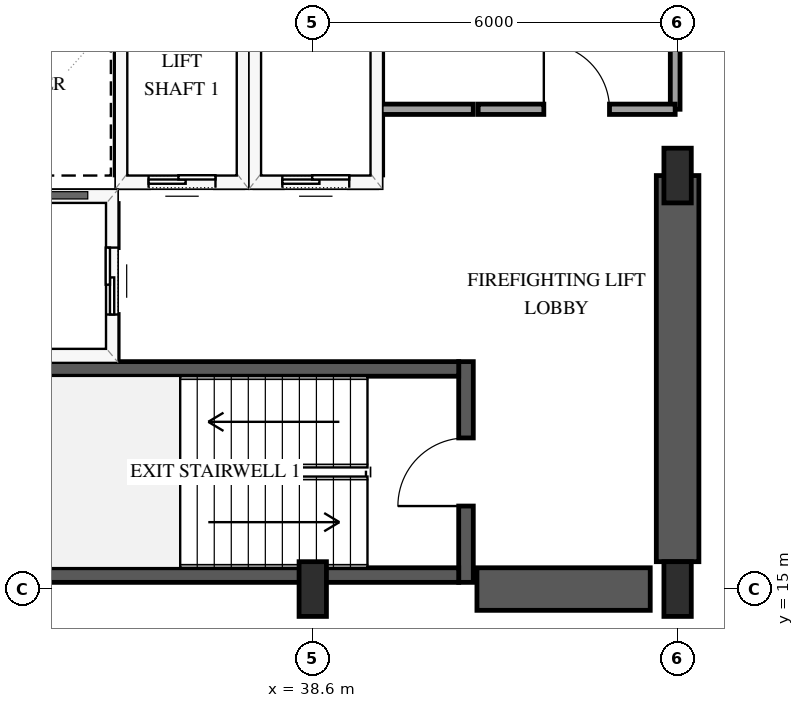
"""IFC4 building model, lengths in metres.
Left out: names, types, materials, properties, quantities, classifications, styles, units other than length and angle.
Written with IfcOpenShell. Run it as: python <this file> out.ifc"""

import sys

from ifc_helpers import new_model, si_unit, direction, frame, frame_2d, origin, origin_2d, place, context, subcontext, project, spatial, rectangle, extrude, element, fill, save


model = new_model("IFC4")
c1 = context("Model", 3, precision=1e-05, world=origin(), true_north=direction((0.0, 1.0)))
c2 = subcontext(c1, "Body", "Model", "MODEL_VIEW")
j1 = project(units=[si_unit("LENGTHUNIT", "METRE"), si_unit("PLANEANGLEUNIT", "RADIAN")], contexts=[c1])
p1 = place(None, origin())
s1 = spatial("IfcSite", under=j1, at=p1, CompositionType="ELEMENT")
p2 = place(p1, origin())
s2 = spatial("IfcBuilding", under=s1, at=p2, CompositionType="ELEMENT")
p3 = place(p2, frame((0.0, 0.0, 42.6)))
s3 = spatial("IfcBuildingStorey", under=s2, at=p3, CompositionType="ELEMENT", Elevation=42.6)
p4 = place(p3, frame((41.12, 15.11, 0.0), z_axis=(0.0, 0.0, 1.0), x_axis=(0.0, 1.0, 0.0)))
e1 = element("IfcWall", 1, at=p4, inside=s3, PredefinedType="SHEAR", context=c2, shape_type="SweptSolid", body=[
    extrude(rectangle(XDim=3.63, YDim=0.24, at=frame_2d((1.815, 0.0))), origin(), (0.0, 0.0, 1.0), 4.0),
])
p5 = place(p4, frame((1.255, 0.0, 0.0)))
e2 = element("IfcOpeningElement", 2, at=p5, cuts=e1, PredefinedType="OPENING", context=c2, shape_type="SweptSolid", body=[
    extrude(rectangle(XDim=1.12, YDim=2.15, at=frame_2d((0.56, 1.075))), frame((0.0, 0.13, 0.0), z_axis=(0.0, -1.0, 0.0), x_axis=(1.0, 0.0, 0.0)), (0.0, 0.0, 1.0), 0.26),
])
for number, where, z_axis, x_axis in (
    (3, (33.0, 15.23, 0.0), (0.0, 0.0, 1.0), (1.0, 0.0, 0.0)),
    (4, (33.0, 18.62, 0.0), (0.0, 0.0, 1.0), (1.0, 0.0, 0.0)),
):
    element("IfcWall", number, at=place(p3, frame(where, z_axis=z_axis, x_axis=x_axis)), inside=s3, PredefinedType="SHEAR", context=c2, shape_type="SweptSolid", body=[
        extrude(rectangle(XDim=8.0, YDim=0.24, at=frame_2d((4.0, 0.0))), origin(), (0.0, 0.0, 1.0), 4.0),
    ])
p6 = place(p3, frame((41.3, 15.0, 0.0), z_axis=(0.0, 0.0, 1.0), x_axis=(1.0, 0.0, 0.0)))
e5 = element("IfcWall", 5, at=p6, inside=s3, PredefinedType="SHEAR", context=c2, shape_type="SweptSolid", body=[
    extrude(rectangle(XDim=2.85, YDim=0.7, at=frame_2d((1.425, 0.0))), origin(), (0.0, 0.0, 1.0), 4.0),
])
p7 = place(p3, frame((44.6, 15.45, 0.0), z_axis=(0.0, 0.0, 1.0), x_axis=(0.0, 1.0, 0.0)))
e6 = element("IfcWall", 6, at=p7, inside=s3, PredefinedType="SHEAR", context=c2, shape_type="SweptSolid", body=[
    extrude(rectangle(XDim=6.35, YDim=0.7, at=frame_2d((3.175, 0.0))), origin(), (0.0, 0.0, 1.0), 4.0),
])
for number, where, z_axis, x_axis in (
    (7, (38.6, 15.0, 0.0), (0.0, 0.0, 1.0), (1.0, 0.0, 0.0)),
    (8, (44.6, 15.0, 0.0), (0.0, 0.0, 1.0), (1.0, 0.0, 0.0)),
    (9, (44.6, 21.8, 0.0), (0.0, 0.0, 1.0), (1.0, 0.0, 0.0)),
):
    element("IfcColumn", number, at=place(p3, frame(where, z_axis=z_axis, x_axis=x_axis)), inside=s3, PredefinedType="PILASTER", context=c2, shape_type="SweptSolid", body=[
        extrude(rectangle(XDim=0.45, YDim=0.9, at=origin_2d()), origin(), (0.0, 0.0, 1.0), 4.0),
    ])
p8 = place(p3, frame((35.45, 21.7, 0.0), z_axis=(0.0, 0.0, 1.0), x_axis=(1.0, 0.0, 0.0)))
e10 = element("IfcWall", 10, at=p8, inside=s3, PredefinedType="SOLIDWALL", context=c2, shape_type="SweptSolid", body=[
    extrude(rectangle(XDim=2.0, YDim=0.2, at=frame_2d((1.0, 0.0))), origin(), (0.0, 0.0, 1.0), 3.7),
])
p9 = place(p8, frame((0.45, 0.0, 0.0)))
e11 = element("IfcOpeningElement", 11, at=p9, cuts=e10, PredefinedType="OPENING", context=c2, shape_type="SweptSolid", body=[
    extrude(rectangle(XDim=1.1, YDim=2.15, at=frame_2d((0.55, 1.075))), frame((0.0, 0.11, 0.0), z_axis=(0.0, -1.0, 0.0), x_axis=(1.0, 0.0, 0.0)), (0.0, 0.0, 1.0), 0.22),
])
for number, where, z_axis, x_axis in (
    (12, (35.45, 21.81, 0.0), (0.0, 0.0, 1.0), (0.0, 1.0, 0.0)),
    (13, (37.45, 21.81, 0.0), (0.0, 0.0, 1.0), (0.0, 1.0, 0.0)),
):
    element("IfcWall", number, at=place(p3, frame(where, z_axis=z_axis, x_axis=x_axis)), inside=s3, PredefinedType="SOLIDWALL", context=c2, shape_type="SweptSolid", body=[
        extrude(rectangle(XDim=2.38, YDim=0.2, at=frame_2d((1.19, 0.0))), origin(), (0.0, 0.0, 1.0), 3.7),
    ])
p10 = place(p3, frame((37.65, 21.7, 0.0), z_axis=(0.0, 0.0, 1.0), x_axis=(1.0, 0.0, 0.0)))
e14 = element("IfcWall", 14, at=p10, inside=s3, PredefinedType="SOLIDWALL", context=c2, shape_type="SweptSolid", body=[
    extrude(rectangle(XDim=2.0, YDim=0.2, at=frame_2d((1.0, 0.0))), origin(), (0.0, 0.0, 1.0), 3.7),
])
p11 = place(p10, frame((0.45, 0.0, 0.0)))
e15 = element("IfcOpeningElement", 15, at=p11, cuts=e14, PredefinedType="OPENING", context=c2, shape_type="SweptSolid", body=[
    extrude(rectangle(XDim=1.1, YDim=2.15, at=frame_2d((0.55, 1.075))), frame((0.0, 0.11, 0.0), z_axis=(0.0, -1.0, 0.0), x_axis=(1.0, 0.0, 0.0)), (0.0, 0.0, 1.0), 0.22),
])
p12 = place(p3, frame((39.65, 21.81, 0.0), z_axis=(0.0, 0.0, 1.0), x_axis=(0.0, 1.0, 0.0)))
e16 = element("IfcWall", 16, at=p12, inside=s3, PredefinedType="SOLIDWALL", context=c2, shape_type="SweptSolid", body=[
    extrude(rectangle(XDim=2.38, YDim=0.2, at=frame_2d((1.19, 0.0))), origin(), (0.0, 0.0, 1.0), 3.7),
])
p13 = place(p3, frame((32.72, 21.45, 0.0), z_axis=(0.0, 0.0, 1.0), x_axis=(1.0, 0.0, 0.0)))
e17 = element("IfcWall", 17, at=p13, inside=s3, PredefinedType="SOLIDWALL", context=c2, shape_type="SweptSolid", body=[
    extrude(rectangle(XDim=2.58, YDim=0.2, at=frame_2d((1.29, 0.0))), origin(), (0.0, 0.0, 1.0), 3.7),
])
p14 = place(p3, frame((35.3, 18.79, 0.0), z_axis=(0.0, 0.0, 1.0), x_axis=(0.0, 1.0, 0.0)))
e18 = element("IfcWall", 18, at=p14, inside=s3, PredefinedType="SOLIDWALL", context=c2, shape_type="SweptSolid", body=[
    extrude(rectangle(XDim=2.55, YDim=0.2, at=frame_2d((1.275, 0.0))), origin(), (0.0, 0.0, 1.0), 3.7),
])
p15 = place(p14, frame((0.725, 0.0, 0.0)))
e19 = element("IfcOpeningElement", 19, at=p15, cuts=e18, PredefinedType="OPENING", context=c2, shape_type="SweptSolid", body=[
    extrude(rectangle(XDim=1.1, YDim=2.15, at=frame_2d((0.55, 1.075))), frame((0.0, 0.11, 0.0), z_axis=(0.0, -1.0, 0.0), x_axis=(1.0, 0.0, 0.0)), (0.0, 0.0, 1.0), 0.22),
])
p16 = place(p3, frame((44.56, 29.8, 0.0), z_axis=(0.0, 0.0, 1.0), x_axis=(0.0, -1.0, 0.0)))
e20 = element("IfcWall", 20, at=p16, inside=s3, PredefinedType="PARTITIONING", context=c2, shape_type="SweptSolid", body=[
    extrude(rectangle(XDim=6.91, YDim=0.16, at=frame_2d((3.455, 0.0))), origin(), (0.0, 0.0, 1.0), 2.74),
])
p17 = place(p16, frame((2.915, 0.0, 0.0)))
e21 = element("IfcOpeningElement", 21, at=p17, cuts=e20, PredefinedType="OPENING", context=c2, shape_type="SweptSolid", body=[
    extrude(rectangle(XDim=1.08, YDim=2.15, at=frame_2d((0.54, 1.075))), frame((0.0, 0.09, 0.0), z_axis=(0.0, -1.0, 0.0), x_axis=(1.0, 0.0, 0.0)), (0.0, 0.0, 1.0), 0.18),
])
p18 = place(p3, frame((41.32, 22.89, 0.0), z_axis=(0.0, 0.0, 1.0), x_axis=(1.0, 0.0, 0.0)))
e22 = element("IfcWall", 22, at=p18, inside=s3, PredefinedType="PARTITIONING", context=c2, shape_type="SweptSolid", body=[
    extrude(rectangle(XDim=3.24, YDim=0.17, at=frame_2d((1.62, 0.0))), origin(), (0.0, 0.0, 1.0), 3.7),
])
p19 = place(p18, frame((1.08, 0.0, 0.0)))
e23 = element("IfcOpeningElement", 23, at=p19, cuts=e22, PredefinedType="OPENING", context=c2, shape_type="SweptSolid", body=[
    extrude(rectangle(XDim=1.08, YDim=2.15, at=frame_2d((0.54, 1.075))), frame((0.0, 0.095, 0.0), z_axis=(0.0, -1.0, 0.0), x_axis=(1.0, 0.0, 0.0)), (0.0, 0.0, 1.0), 0.19),
])
p20 = place(p3, frame((39.72, 22.89, 0.0), z_axis=(0.0, 0.0, 1.0), x_axis=(1.0, 0.0, 0.0)))
e24 = element("IfcWall", 24, at=p20, inside=s3, PredefinedType="PARTITIONING", context=c2, shape_type="SweptSolid", body=[
    extrude(rectangle(XDim=1.52, YDim=0.17, at=frame_2d((0.76, 0.0))), origin(), (0.0, 0.0, 1.0), 3.7),
])
p21 = place(p9, origin())
e25 = element("IfcDoor", 25, at=p21, inside=s3, OperationType="SLIDING_TO_LEFT", PredefinedType="DOOR", context=c2, shape_type="SweptSolid", body=[
    extrude(rectangle(XDim=1.1, YDim=2.15, at=frame_2d((0.55, 1.075))), frame((0.0, 0.025, 0.0), z_axis=(0.0, -1.0, 0.0), x_axis=(1.0, 0.0, 0.0)), (0.0, 0.0, 1.0), 0.05),
])
fill(e11, e25)
p22 = place(p11, origin())
e26 = element("IfcDoor", 26, at=p22, inside=s3, OperationType="SLIDING_TO_LEFT", PredefinedType="DOOR", context=c2, shape_type="SweptSolid", body=[
    extrude(rectangle(XDim=1.1, YDim=2.15, at=frame_2d((0.55, 1.075))), frame((0.0, 0.025, 0.0), z_axis=(0.0, -1.0, 0.0), x_axis=(1.0, 0.0, 0.0)), (0.0, 0.0, 1.0), 0.05),
])
fill(e15, e26)
p23 = place(p15, origin())
e27 = element("IfcDoor", 27, at=p23, inside=s3, OperationType="SLIDING_TO_LEFT", PredefinedType="DOOR", context=c2, shape_type="SweptSolid", body=[
    extrude(rectangle(XDim=1.1, YDim=2.15, at=frame_2d((0.55, 1.075))), frame((0.0, 0.025, 0.0), z_axis=(0.0, -1.0, 0.0), x_axis=(1.0, 0.0, 0.0)), (0.0, 0.0, 1.0), 0.05),
])
fill(e19, e27)
p24 = place(p5, origin())
e28 = element("IfcDoor", 28, at=p24, inside=s3, OperationType="SINGLE_SWING_LEFT", PredefinedType="DOOR", context=c2, shape_type="SweptSolid", body=[
    extrude(rectangle(XDim=1.12, YDim=2.15, at=frame_2d((0.56, 1.075))), frame((0.0, 0.025, 0.0), z_axis=(0.0, -1.0, 0.0), x_axis=(1.0, 0.0, 0.0)), (0.0, 0.0, 1.0), 0.05),
])
fill(e2, e28)
p25 = place(p19, origin())
e29 = element("IfcDoor", 29, at=p25, inside=s3, OperationType="SINGLE_SWING_LEFT", PredefinedType="DOOR", context=c2, shape_type="SweptSolid", body=[
    extrude(rectangle(XDim=1.08, YDim=2.15, at=frame_2d((0.54, 1.075))), frame((0.0, 0.025, 0.0), z_axis=(0.0, -1.0, 0.0), x_axis=(1.0, 0.0, 0.0)), (0.0, 0.0, 1.0), 0.05),
])
fill(e23, e29)
save(model, sys.argv[1])
